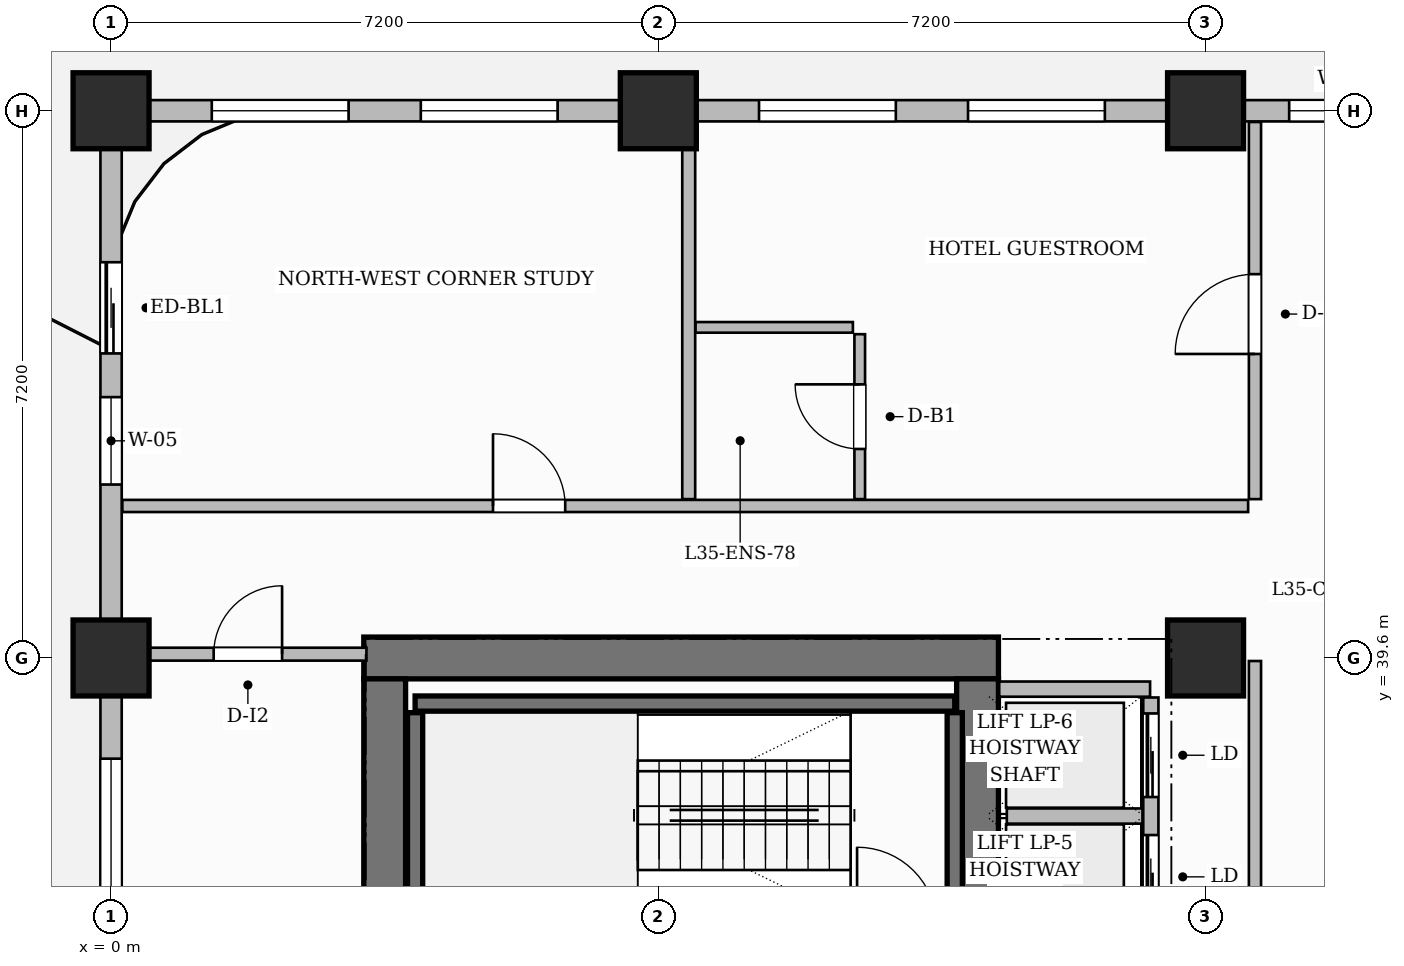
"""IFC4 building model, lengths in metres.
Left out: names, types, materials, properties, quantities, classifications, styles, units other than length and angle.
Written with IfcOpenShell. Run it as: python <this file> out.ifc"""

import sys

from ifc_helpers import new_model, si_unit, direction, frame, frame_2d, origin, origin_2d, place, context, subcontext, project, spatial, rectangle, extrude, source, transform, mapped, element, fill, save


model = new_model("IFC4")
c1 = context("Model", 3, precision=1e-05, world=origin(), true_north=direction((0.0, 1.0)))
c2 = subcontext(c1, "Body", "Model", "MODEL_VIEW")
j1 = project(units=[si_unit("LENGTHUNIT", "METRE"), si_unit("PLANEANGLEUNIT", "RADIAN")], contexts=[c1])
p1 = place(None, origin())
s1 = spatial("IfcSite", under=j1, at=p1, CompositionType="ELEMENT")
p2 = place(p1, origin())
s2 = spatial("IfcBuilding", under=s1, at=p2, CompositionType="ELEMENT")
p3 = place(p2, frame((0.0, 0.0, 141.4)))
s3 = spatial("IfcBuildingStorey", under=s2, at=p3, CompositionType="ELEMENT", Elevation=141.4)
p4 = place(p3, frame((3.325, 39.6, 0.0), z_axis=(0.0, 0.0, 1.0), x_axis=(1.0, 0.0, 0.0)))
e1 = element("IfcWall", 1, at=p4, inside=s3, PredefinedType="SHEAR", context=c2, shape_type="SweptSolid", body=[
    extrude(rectangle(XDim=8.35, YDim=0.55, at=frame_2d((4.175, 0.0))), origin(), (0.0, 0.0, 1.0), 3.7),
])
p5 = place(p3, frame((3.6, 25.475, 0.0), z_axis=(0.0, 0.0, 1.0), x_axis=(0.0, 1.0, 0.0)))
e2 = element("IfcWall", 2, at=p5, inside=s3, PredefinedType="SHEAR", context=c2, shape_type="SweptSolid", body=[
    extrude(rectangle(XDim=13.85, YDim=0.55, at=frame_2d((6.925, 0.0))), origin(), (0.0, 0.0, 1.0), 3.7),
])
p6 = place(p3, frame((11.4, 25.475, 0.0), z_axis=(0.0, 0.0, 1.0), x_axis=(0.0, 1.0, 0.0)))
e3 = element("IfcWall", 3, at=p6, inside=s3, PredefinedType="SHEAR", context=c2, shape_type="SweptSolid", body=[
    extrude(rectangle(XDim=13.85, YDim=0.55, at=frame_2d((6.925, 0.0))), origin(), (0.0, 0.0, 1.0), 3.7),
])
p7 = place(p6, frame((6.495, 0.0, 0.0)))
e4 = element("IfcOpeningElement", 4, at=p7, cuts=e3, PredefinedType="OPENING", context=c2, shape_type="SweptSolid", body=[
    extrude(rectangle(XDim=1.5, YDim=2.2, at=frame_2d((0.75, 1.1))), frame((0.0, 0.285, 0.0), z_axis=(0.0, -1.0, 0.0), x_axis=(1.0, 0.0, 0.0)), (0.0, 0.0, 1.0), 0.57),
])
m1 = source(origin(), c2, "Body", "SweptSolid", [
    extrude(rectangle(XDim=1.0, YDim=1.0, at=origin_2d()), origin(), (0.0, 0.0, 1.0), 3.7),
])
for number, where, z_axis, x_axis in (
    (5, (0.0, 39.6, 0.0), (0.0, 0.0, 1.0), (1.0, 0.0, 0.0)),
    (6, (0.0, 46.8, 0.0), (0.0, 0.0, 1.0), (1.0, 0.0, 0.0)),
    (7, (7.2, 46.8, 0.0), (0.0, 0.0, 1.0), (1.0, 0.0, 0.0)),
    (8, (14.4, 39.6, 0.0), (0.0, 0.0, 1.0), (1.0, 0.0, 0.0)),
    (9, (14.4, 46.8, 0.0), (0.0, 0.0, 1.0), (1.0, 0.0, 0.0)),
):
    element("IfcColumn", number, at=place(p3, frame(where, z_axis=z_axis, x_axis=x_axis)), inside=s3, PredefinedType="COLUMN", context=c2, shape_type="MappedRepresentation", body=[
        mapped(m1, transform((0.0, 0.0, 0.0), scale=1.0)),
    ])
p8 = place(p3, frame((4.0, 39.0, 0.0), z_axis=(0.0, 0.0, 1.0), x_axis=(1.0, 0.0, 0.0)))
e10 = element("IfcWall", 10, at=p8, inside=s3, PredefinedType="SHEAR", context=c2, shape_type="SweptSolid", body=[
    extrude(rectangle(XDim=7.1, YDim=0.2, at=frame_2d((3.55, 0.0))), origin(), (0.0, 0.0, 1.0), 3.7),
])
for number, where, z_axis, x_axis in (
    (11, (4.0, 36.18, 0.0), (0.0, 0.0, 1.0), (0.0, 1.0, 0.0)),
    (12, (11.1, 36.18, 0.0), (0.0, 0.0, 1.0), (0.0, 1.0, 0.0)),
):
    element("IfcWall", number, at=place(p3, frame(where, z_axis=z_axis, x_axis=x_axis)), inside=s3, PredefinedType="SHEAR", context=c2, shape_type="SweptSolid", body=[
        extrude(rectangle(XDim=2.7, YDim=0.2, at=frame_2d((1.35, 0.0))), origin(), (0.0, 0.0, 1.0), 3.7),
    ])
p9 = place(p3, frame((11.685, 39.19, 0.0), z_axis=(0.0, 0.0, 1.0), x_axis=(1.0, 0.0, 0.0)))
e13 = element("IfcWall", 13, at=p9, inside=s3, PredefinedType="PARTITIONING", context=c2, shape_type="SweptSolid", body=[
    extrude(rectangle(XDim=1.985, YDim=0.2, at=frame_2d((0.992, 0.0))), origin(), (0.0, 0.0, 1.0), 3.4),
])
p10 = place(p3, frame((13.68, 34.36, 0.0), z_axis=(0.0, 0.0, 1.0), x_axis=(0.0, 1.0, 0.0)))
e14 = element("IfcWall", 14, at=p10, inside=s3, PredefinedType="PARTITIONING", context=c2, shape_type="SweptSolid", body=[
    extrude(rectangle(XDim=4.72, YDim=0.2, at=frame_2d((2.36, 0.0))), origin(), (0.0, 0.0, 1.0), 3.4),
])
p11 = place(p10, frame((0.21, 0.0, 0.0)))
e15 = element("IfcOpeningElement", 15, at=p11, cuts=e14, PredefinedType="OPENING", context=c2, shape_type="SweptSolid", body=[
    extrude(rectangle(XDim=1.1, YDim=2.2, at=frame_2d((0.55, 1.1))), frame((0.0, 0.11, 0.0), z_axis=(0.0, -1.0, 0.0), x_axis=(1.0, 0.0, 0.0)), (0.0, 0.0, 1.0), 0.22),
])
p12 = place(p10, frame((1.81, 0.0, 0.0)))
e16 = element("IfcOpeningElement", 16, at=p12, cuts=e14, PredefinedType="OPENING", context=c2, shape_type="SweptSolid", body=[
    extrude(rectangle(XDim=1.1, YDim=2.2, at=frame_2d((0.55, 1.1))), frame((0.0, 0.11, 0.0), z_axis=(0.0, -1.0, 0.0), x_axis=(1.0, 0.0, 0.0)), (0.0, 0.0, 1.0), 0.22),
])
p13 = place(p10, frame((3.41, 0.0, 0.0)))
e17 = element("IfcOpeningElement", 17, at=p13, cuts=e14, PredefinedType="OPENING", context=c2, shape_type="SweptSolid", body=[
    extrude(rectangle(XDim=1.1, YDim=2.2, at=frame_2d((0.55, 1.1))), frame((0.0, 0.11, 0.0), z_axis=(0.0, -1.0, 0.0), x_axis=(1.0, 0.0, 0.0)), (0.0, 0.0, 1.0), 0.22),
])
p14 = place(p3, frame((11.785, 37.52, 0.0), z_axis=(0.0, 0.0, 1.0), x_axis=(1.0, 0.0, 0.0)))
e18 = element("IfcWall", 18, at=p14, inside=s3, PredefinedType="PARTITIONING", context=c2, shape_type="SweptSolid", body=[
    extrude(rectangle(XDim=1.785, YDim=0.2, at=frame_2d((0.893, 0.0))), origin(), (0.0, 0.0, 1.0), 3.4),
])
p15 = place(p3, frame((0.24, 39.65, 0.0), z_axis=(0.0, 0.0, 1.0), x_axis=(1.0, 0.0, 0.0)))
e19 = element("IfcWall", 19, at=p15, inside=s3, PredefinedType="PARTITIONING", context=c2, shape_type="SweptSolid", body=[
    extrude(rectangle(XDim=3.12, YDim=0.17, at=frame_2d((1.56, 0.0))), origin(), (0.0, 0.0, 1.0), 3.4),
])
p16 = place(p15, frame((1.11, 0.0, 0.0)))
e20 = element("IfcOpeningElement", 20, at=p16, cuts=e19, PredefinedType="OPENING", context=c2, shape_type="SweptSolid", body=[
    extrude(rectangle(XDim=0.9, YDim=2.15, at=frame_2d((0.45, 1.075))), frame((0.0, 0.095, 0.0), z_axis=(0.0, -1.0, 0.0), x_axis=(1.0, 0.0, 0.0)), (0.0, 0.0, 1.0), 0.19),
])
p17 = place(p3, frame((15.05, 34.34, 0.0), z_axis=(0.0, 0.0, 1.0), x_axis=(0.0, 1.0, 0.0)))
e21 = element("IfcWall", 21, at=p17, inside=s3, PredefinedType="PARTITIONING", context=c2, shape_type="SweptSolid", body=[
    extrude(rectangle(XDim=5.22, YDim=0.16, at=frame_2d((2.61, 0.0))), origin(), (0.0, 0.0, 1.0), 3.4),
])
p18 = place(p3, frame((15.05, 41.69, 0.0), z_axis=(0.0, 0.0, 1.0), x_axis=(0.0, 1.0, 0.0)))
e22 = element("IfcWall", 22, at=p18, inside=s3, PredefinedType="PARTITIONING", context=c2, shape_type="SweptSolid", body=[
    extrude(rectangle(XDim=4.962, YDim=0.16, at=frame_2d((2.481, 0.0))), origin(), (0.0, 0.0, 1.0), 3.4),
])
p19 = place(p18, frame((1.91, 0.0, 0.0)))
e23 = element("IfcOpeningElement", 23, at=p19, cuts=e22, PredefinedType="OPENING", context=c2, shape_type="SweptSolid", body=[
    extrude(rectangle(XDim=1.05, YDim=2.25, at=frame_2d((0.525, 1.125))), frame((0.0, 0.09, 0.0), z_axis=(0.0, -1.0, 0.0), x_axis=(1.0, 0.0, 0.0)), (0.0, 0.0, 1.0), 0.18),
])
p20 = place(p3, frame((7.6, 41.69, 0.0), z_axis=(0.0, 0.0, 1.0), x_axis=(0.0, 1.0, 0.0)))
e24 = element("IfcWall", 24, at=p20, inside=s3, PredefinedType="PARTITIONING", context=c2, shape_type="SweptSolid", body=[
    extrude(rectangle(XDim=4.87, YDim=0.17, at=frame_2d((2.435, 0.0))), origin(), (0.0, 0.0, 1.0), 3.4),
])
p21 = place(p3, frame((0.148, 41.6, 0.0), z_axis=(0.0, 0.0, 1.0), x_axis=(1.0, 0.0, 0.0)))
e25 = element("IfcWall", 25, at=p21, inside=s3, PredefinedType="PARTITIONING", context=c2, shape_type="SweptSolid", body=[
    extrude(rectangle(XDim=14.812, YDim=0.16, at=frame_2d((7.406, 0.0))), origin(), (0.0, 0.0, 1.0), 2.885),
])
p22 = place(p21, frame((4.877, 0.0, 0.0)))
e26 = element("IfcOpeningElement", 26, at=p22, cuts=e25, PredefinedType="OPENING", context=c2, shape_type="SweptSolid", body=[
    extrude(rectangle(XDim=0.95, YDim=2.15, at=frame_2d((0.475, 1.075))), frame((0.0, 0.09, 0.0), z_axis=(0.0, -1.0, 0.0), x_axis=(1.0, 0.0, 0.0)), (0.0, 0.0, 1.0), 0.18),
])
p23 = place(p3, frame((7.69, 43.95, 0.0), z_axis=(0.0, 0.0, 1.0), x_axis=(1.0, 0.0, 0.0)))
e27 = element("IfcWall", 27, at=p23, inside=s3, PredefinedType="PARTITIONING", context=c2, shape_type="SweptSolid", body=[
    extrude(rectangle(XDim=2.07, YDim=0.14, at=frame_2d((1.035, 0.0))), origin(), (0.0, 0.0, 1.0), 2.885),
])
p24 = place(p3, frame((9.85, 41.69, 0.0), z_axis=(0.0, 0.0, 1.0), x_axis=(0.0, 1.0, 0.0)))
e28 = element("IfcWall", 28, at=p24, inside=s3, PredefinedType="PARTITIONING", context=c2, shape_type="SweptSolid", body=[
    extrude(rectangle(XDim=2.17, YDim=0.14, at=frame_2d((1.085, 0.0))), origin(), (0.0, 0.0, 1.0), 3.4),
])
p25 = place(p24, frame((0.66, 0.0, 0.0)))
e29 = element("IfcOpeningElement", 29, at=p25, cuts=e28, PredefinedType="OPENING", context=c2, shape_type="SweptSolid", body=[
    extrude(rectangle(XDim=0.85, YDim=2.1, at=frame_2d((0.425, 1.05))), frame((0.0, 0.08, 0.0), z_axis=(0.0, -1.0, 0.0), x_axis=(1.0, 0.0, 0.0)), (0.0, 0.0, 1.0), 0.16),
])
p26 = place(p3, frame((0.0, 25.25, 0.0), z_axis=(0.0, 0.0, 1.0), x_axis=(0.0, 1.0, 0.0)))
e30 = element("IfcWall", 30, at=p26, inside=s3, PredefinedType="SOLIDWALL", context=c2, shape_type="SweptSolid", body=[
    extrude(rectangle(XDim=21.5, YDim=0.28, at=frame_2d((10.75, 0.0))), origin(), (0.0, 0.0, 1.0), 2.885),
])
p27 = place(p26, frame((18.357, 0.0, 0.0)))
e31 = element("IfcOpeningElement", 31, at=p27, cuts=e30, PredefinedType="OPENING", context=c2, shape_type="SweptSolid", body=[
    extrude(rectangle(XDim=1.2, YDim=2.2, at=frame_2d((0.6, 1.1))), frame((0.0, 0.15, 0.0), z_axis=(0.0, -1.0, 0.0), x_axis=(1.0, 0.0, 0.0)), (0.0, 0.0, 1.0), 0.3),
])
p28 = place(p26, frame((0.8, 0.0, 0.0)))
e32 = element("IfcOpeningElement", 32, at=p28, cuts=e30, PredefinedType="OPENING", context=c2, shape_type="SweptSolid", body=[
    extrude(rectangle(XDim=1.2, YDim=2.2, at=frame_2d((0.6, 1.1))), frame((0.0, 0.15, 0.0), z_axis=(0.0, -1.0, 0.0), x_axis=(1.0, 0.0, 0.0)), (0.0, 0.0, 1.0), 0.3),
])
p29 = place(p26, frame((3.425, 0.0, 0.8)))
e33 = element("IfcOpeningElement", 33, at=p29, cuts=e30, PredefinedType="OPENING", context=c2, shape_type="SweptSolid", body=[
    extrude(rectangle(XDim=1.8, YDim=1.85, at=frame_2d((0.9, 0.925))), frame((0.0, 0.15, 0.0), z_axis=(0.0, -1.0, 0.0), x_axis=(1.0, 0.0, 0.0)), (0.0, 0.0, 1.0), 0.3),
])
p30 = place(p26, frame((8.475, 0.0, 0.8)))
e34 = element("IfcOpeningElement", 34, at=p30, cuts=e30, PredefinedType="OPENING", context=c2, shape_type="SweptSolid", body=[
    extrude(rectangle(XDim=1.8, YDim=1.85, at=frame_2d((0.9, 0.925))), frame((0.0, 0.15, 0.0), z_axis=(0.0, -1.0, 0.0), x_axis=(1.0, 0.0, 0.0)), (0.0, 0.0, 1.0), 0.3),
])
p31 = place(p26, frame((11.225, 0.0, 0.8)))
e35 = element("IfcOpeningElement", 35, at=p31, cuts=e30, PredefinedType="OPENING", context=c2, shape_type="SweptSolid", body=[
    extrude(rectangle(XDim=1.8, YDim=1.85, at=frame_2d((0.9, 0.925))), frame((0.0, 0.15, 0.0), z_axis=(0.0, -1.0, 0.0), x_axis=(1.0, 0.0, 0.0)), (0.0, 0.0, 1.0), 0.3),
])
p32 = place(p26, frame((16.632, 0.0, 0.8)))
e36 = element("IfcOpeningElement", 36, at=p32, cuts=e30, PredefinedType="OPENING", context=c2, shape_type="SweptSolid", body=[
    extrude(rectangle(XDim=1.15, YDim=1.8, at=frame_2d((0.575, 0.9))), frame((0.0, 0.15, 0.0), z_axis=(0.0, -1.0, 0.0), x_axis=(1.0, 0.0, 0.0)), (0.0, 0.0, 1.0), 0.3),
])
p33 = place(p3, frame((0.0, 46.8, 0.0), z_axis=(0.0, 0.0, 1.0), x_axis=(1.0, 0.0, 0.0)))
e37 = element("IfcWall", 37, at=p33, inside=s3, PredefinedType="SOLIDWALL", context=c2, shape_type="SweptSolid", body=[
    extrude(rectangle(XDim=18.0, YDim=0.28, at=frame_2d((9.0, 0.0))), origin(), (0.0, 0.0, 1.0), 2.885),
])
p34 = place(p33, frame((1.325, 0.0, 0.8)))
e38 = element("IfcOpeningElement", 38, at=p34, cuts=e37, PredefinedType="OPENING", context=c2, shape_type="SweptSolid", body=[
    extrude(rectangle(XDim=1.8, YDim=1.85, at=frame_2d((0.9, 0.925))), frame((0.0, 0.15, 0.0), z_axis=(0.0, -1.0, 0.0), x_axis=(1.0, 0.0, 0.0)), (0.0, 0.0, 1.0), 0.3),
])
p35 = place(p33, frame((4.075, 0.0, 0.8)))
e39 = element("IfcOpeningElement", 39, at=p35, cuts=e37, PredefinedType="OPENING", context=c2, shape_type="SweptSolid", body=[
    extrude(rectangle(XDim=1.8, YDim=1.85, at=frame_2d((0.9, 0.925))), frame((0.0, 0.15, 0.0), z_axis=(0.0, -1.0, 0.0), x_axis=(1.0, 0.0, 0.0)), (0.0, 0.0, 1.0), 0.3),
])
p36 = place(p33, frame((8.525, 0.0, 0.8)))
e40 = element("IfcOpeningElement", 40, at=p36, cuts=e37, PredefinedType="OPENING", context=c2, shape_type="SweptSolid", body=[
    extrude(rectangle(XDim=1.8, YDim=1.85, at=frame_2d((0.9, 0.925))), frame((0.0, 0.15, 0.0), z_axis=(0.0, -1.0, 0.0), x_axis=(1.0, 0.0, 0.0)), (0.0, 0.0, 1.0), 0.3),
])
p37 = place(p33, frame((11.275, 0.0, 0.8)))
e41 = element("IfcOpeningElement", 41, at=p37, cuts=e37, PredefinedType="OPENING", context=c2, shape_type="SweptSolid", body=[
    extrude(rectangle(XDim=1.8, YDim=1.85, at=frame_2d((0.9, 0.925))), frame((0.0, 0.15, 0.0), z_axis=(0.0, -1.0, 0.0), x_axis=(1.0, 0.0, 0.0)), (0.0, 0.0, 1.0), 0.3),
])
p38 = place(p33, frame((15.5, 0.0, 0.8)))
e42 = element("IfcOpeningElement", 42, at=p38, cuts=e37, PredefinedType="OPENING", context=c2, shape_type="SweptSolid", body=[
    extrude(rectangle(XDim=1.4, YDim=1.85, at=frame_2d((0.7, 0.925))), frame((0.0, 0.15, 0.0), z_axis=(0.0, -1.0, 0.0), x_axis=(1.0, 0.0, 0.0)), (0.0, 0.0, 1.0), 0.3),
])
m2 = source(origin(), c2, "Body", "SweptSolid", [
    extrude(rectangle(XDim=0.9, YDim=2.15, at=frame_2d((0.45, 1.075))), frame((0.0, 0.025, 0.0), z_axis=(0.0, -1.0, 0.0), x_axis=(1.0, 0.0, 0.0)), (0.0, 0.0, 1.0), 0.05),
])
p39 = place(p16, origin())
e43 = element("IfcDoor", 43, at=p39, inside=s3, OperationType="SINGLE_SWING_RIGHT", PredefinedType="DOOR", context=c2, shape_type="MappedRepresentation", body=[
    mapped(m2, transform((0.0, 0.0, 0.0), scale=1.0)),
])
fill(e20, e43)
m3 = source(origin(), c2, "Body", "SweptSolid", [
    extrude(rectangle(XDim=0.95, YDim=2.15, at=frame_2d((0.475, 1.075))), frame((0.0, 0.025, 0.0), z_axis=(0.0, -1.0, 0.0), x_axis=(1.0, 0.0, 0.0)), (0.0, 0.0, 1.0), 0.05),
])
p40 = place(p22, origin())
e44 = element("IfcDoor", 44, at=p40, inside=s3, OperationType="SINGLE_SWING_LEFT", PredefinedType="DOOR", context=c2, shape_type="MappedRepresentation", body=[
    mapped(m3, transform((0.0, 0.0, 0.0), scale=1.0)),
])
fill(e26, e44)
m4 = source(origin(), c2, "Body", "SweptSolid", [
    extrude(rectangle(XDim=0.85, YDim=2.1, at=frame_2d((0.425, 1.05))), frame((0.0, 0.025, 0.0), z_axis=(0.0, -1.0, 0.0), x_axis=(1.0, 0.0, 0.0)), (0.0, 0.0, 1.0), 0.05),
])
p41 = place(p25, origin())
e45 = element("IfcDoor", 45, at=p41, inside=s3, OperationType="SINGLE_SWING_RIGHT", PredefinedType="DOOR", context=c2, shape_type="MappedRepresentation", body=[
    mapped(m4, transform((0.0, 0.0, 0.0), scale=1.0)),
])
fill(e29, e45)
m5 = source(origin(), c2, "Body", "SweptSolid", [
    extrude(rectangle(XDim=1.05, YDim=2.25, at=frame_2d((0.525, 1.125))), frame((0.0, 0.025, 0.0), z_axis=(0.0, -1.0, 0.0), x_axis=(1.0, 0.0, 0.0)), (0.0, 0.0, 1.0), 0.05),
])
p42 = place(p19, origin())
e46 = element("IfcDoor", 46, at=p42, inside=s3, OperationType="SINGLE_SWING_LEFT", PredefinedType="DOOR", context=c2, shape_type="MappedRepresentation", body=[
    mapped(m5, transform((0.0, 0.0, 0.0), scale=1.0)),
])
fill(e23, e46)
m6 = source(origin(), c2, "Body", "SweptSolid", [
    extrude(rectangle(XDim=1.1, YDim=2.2, at=frame_2d((0.55, 1.1))), frame((0.0, 0.025, 0.0), z_axis=(0.0, -1.0, 0.0), x_axis=(1.0, 0.0, 0.0)), (0.0, 0.0, 1.0), 0.05),
])
p43 = place(p12, origin())
e47 = element("IfcDoor", 47, at=p43, inside=s3, OperationType="SLIDING_TO_LEFT", PredefinedType="DOOR", context=c2, shape_type="MappedRepresentation", body=[
    mapped(m6, transform((0.0, 0.0, 0.0), scale=1.0)),
])
fill(e16, e47)
p44 = place(p13, origin())
e48 = element("IfcDoor", 48, at=p44, inside=s3, OperationType="SLIDING_TO_LEFT", PredefinedType="DOOR", context=c2, shape_type="MappedRepresentation", body=[
    mapped(m6, transform((0.0, 0.0, 0.0), scale=1.0)),
])
fill(e17, e48)
m7 = source(origin(), c2, "Body", "SweptSolid", [
    extrude(rectangle(XDim=1.2, YDim=2.2, at=frame_2d((0.6, 1.1))), frame((0.0, 0.025, 0.0), z_axis=(0.0, -1.0, 0.0), x_axis=(1.0, 0.0, 0.0)), (0.0, 0.0, 1.0), 0.05),
])
p45 = place(p27, origin())
e49 = element("IfcDoor", 49, at=p45, inside=s3, OperationType="SLIDING_TO_LEFT", PredefinedType="DOOR", context=c2, shape_type="MappedRepresentation", body=[
    mapped(m7, transform((0.0, 0.0, 0.0), scale=1.0)),
])
fill(e31, e49)
m8 = source(origin(), c2, "Body", "SweptSolid", [
    extrude(rectangle(XDim=1.8, YDim=1.85, at=frame_2d((0.9, 0.925))), frame((0.0, 0.03, 0.0), z_axis=(0.0, -1.0, 0.0), x_axis=(1.0, 0.0, 0.0)), (0.0, 0.0, 1.0), 0.06),
])
p46 = place(p31, origin())
e50 = element("IfcWindow", 50, at=p46, inside=s3, PartitioningType="DOUBLE_PANEL_VERTICAL", PredefinedType="WINDOW", context=c2, shape_type="MappedRepresentation", body=[
    mapped(m8, transform((0.0, 0.0, 0.0), scale=1.0)),
])
fill(e35, e50)
m9 = source(origin(), c2, "Body", "SweptSolid", [
    extrude(rectangle(XDim=1.15, YDim=1.8, at=frame_2d((0.575, 0.9))), frame((0.0, 0.03, 0.0), z_axis=(0.0, -1.0, 0.0), x_axis=(1.0, 0.0, 0.0)), (0.0, 0.0, 1.0), 0.06),
])
p47 = place(p32, origin())
e51 = element("IfcWindow", 51, at=p47, inside=s3, PartitioningType="SINGLE_PANEL", PredefinedType="WINDOW", context=c2, shape_type="MappedRepresentation", body=[
    mapped(m9, transform((0.0, 0.0, 0.0), scale=1.0)),
])
fill(e36, e51)
p48 = place(p34, origin())
e52 = element("IfcWindow", 52, at=p48, inside=s3, PartitioningType="DOUBLE_PANEL_VERTICAL", PredefinedType="WINDOW", context=c2, shape_type="MappedRepresentation", body=[
    mapped(m8, transform((0.0, 0.0, 0.0), scale=1.0)),
])
fill(e38, e52)
p49 = place(p35, origin())
e53 = element("IfcWindow", 53, at=p49, inside=s3, PartitioningType="DOUBLE_PANEL_VERTICAL", PredefinedType="WINDOW", context=c2, shape_type="MappedRepresentation", body=[
    mapped(m8, transform((0.0, 0.0, 0.0), scale=1.0)),
])
fill(e39, e53)
p50 = place(p36, origin())
e54 = element("IfcWindow", 54, at=p50, inside=s3, PartitioningType="DOUBLE_PANEL_VERTICAL", PredefinedType="WINDOW", context=c2, shape_type="MappedRepresentation", body=[
    mapped(m8, transform((0.0, 0.0, 0.0), scale=1.0)),
])
fill(e40, e54)
p51 = place(p37, origin())
e55 = element("IfcWindow", 55, at=p51, inside=s3, PartitioningType="DOUBLE_PANEL_VERTICAL", PredefinedType="WINDOW", context=c2, shape_type="MappedRepresentation", body=[
    mapped(m8, transform((0.0, 0.0, 0.0), scale=1.0)),
])
fill(e41, e55)
m10 = source(origin(), c2, "Body", "SweptSolid", [
    extrude(rectangle(XDim=1.4, YDim=1.85, at=frame_2d((0.7, 0.925))), frame((0.0, 0.03, 0.0), z_axis=(0.0, -1.0, 0.0), x_axis=(1.0, 0.0, 0.0)), (0.0, 0.0, 1.0), 0.06),
])
p52 = place(p38, origin())
e56 = element("IfcWindow", 56, at=p52, inside=s3, PartitioningType="SINGLE_PANEL", PredefinedType="WINDOW", context=c2, shape_type="MappedRepresentation", body=[
    mapped(m10, transform((0.0, 0.0, 0.0), scale=1.0)),
])
fill(e42, e56)
save(model, sys.argv[1])
